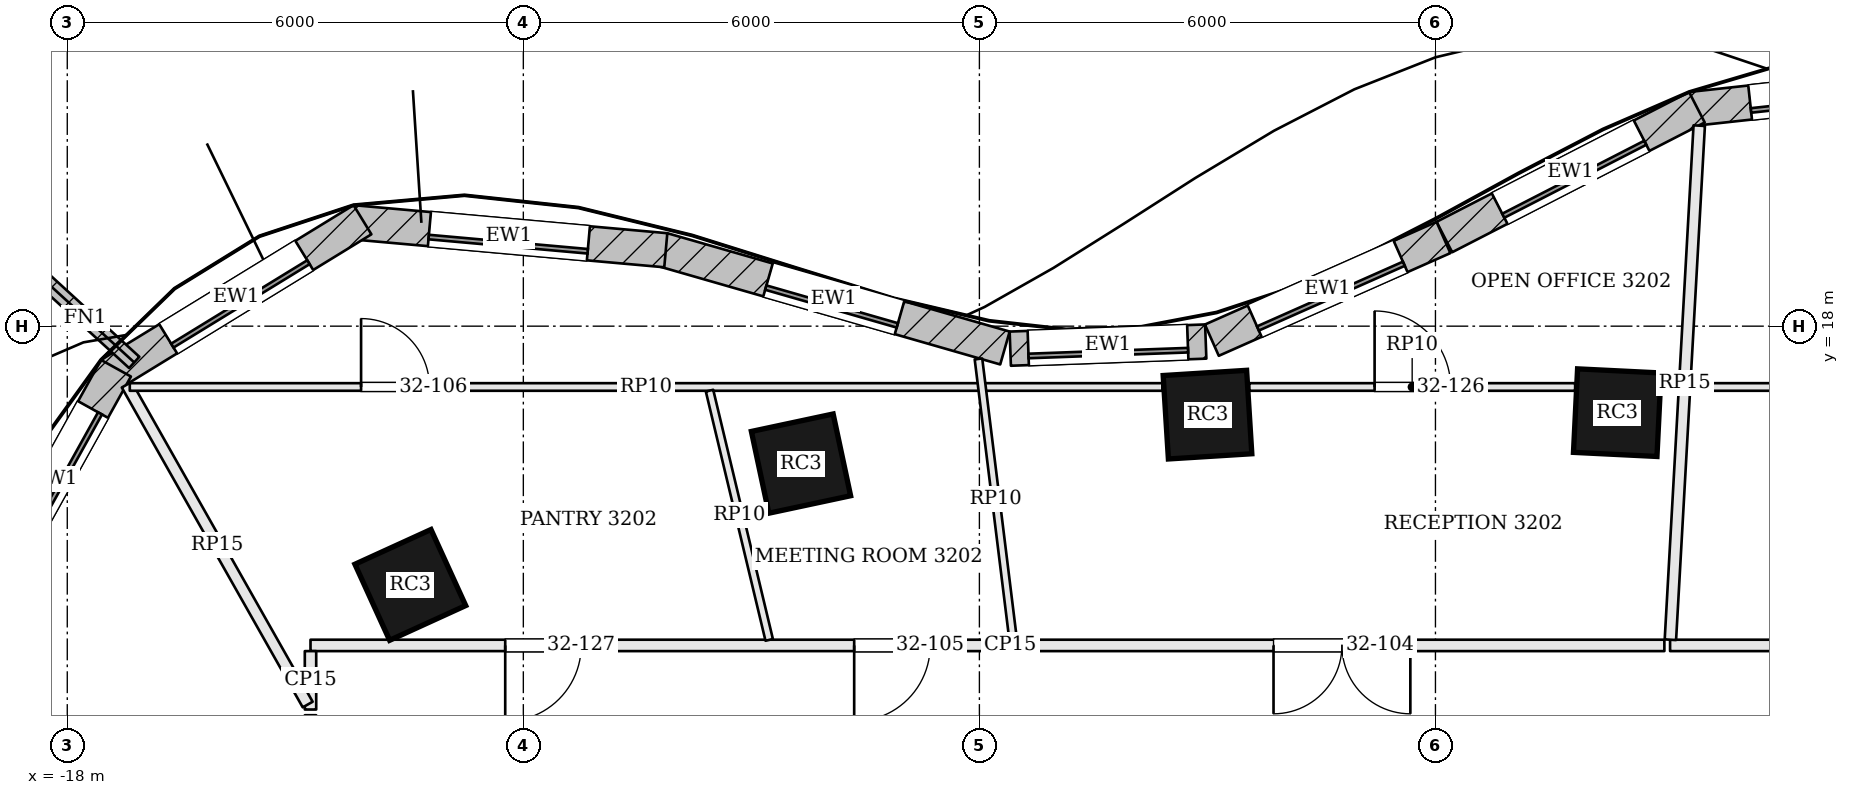
"""IFC4 building model, lengths in metres.
Left out: names, types, materials, properties, quantities, classifications, styles, units other than length and angle.
Written with IfcOpenShell. Run it as: python <this file> out.ifc"""

import sys

from ifc_helpers import new_model, si_unit, direction, frame, frame_2d, origin, origin_2d, place, context, subcontext, project, spatial, rectangle, extrude, element, fill, save


model = new_model("IFC4")
c1 = context("Model", 3, precision=1e-05, world=origin(), true_north=direction((0.0, 1.0)))
c2 = subcontext(c1, "Body", "Model", "MODEL_VIEW")
j1 = project(units=[si_unit("LENGTHUNIT", "METRE"), si_unit("PLANEANGLEUNIT", "RADIAN")], contexts=[c1])
p1 = place(None, origin())
s1 = spatial("IfcSite", under=j1, at=p1, CompositionType="ELEMENT")
p2 = place(p1, origin())
s2 = spatial("IfcBuilding", under=s1, at=p2, CompositionType="ELEMENT")
p3 = place(p2, frame((0.0, 0.0, 134.4)))
s3 = spatial("IfcBuildingStorey", under=s2, at=p3, CompositionType="ELEMENT", Elevation=134.4)
for number, where, z_axis, x_axis in (
    (1, (2.392, 16.862, 0.0), (0.0, 0.0, 1.0), (-0.999, 0.049, 0.0)),
    (2, (-2.999, 16.836, 0.0), (0.0, 0.0, 1.0), (-0.998, -0.062, 0.0)),
    (3, (-8.347, 16.192, 0.0), (0.0, 0.0, 1.0), (-0.978, -0.209, 0.0)),
    (4, (-13.487, 14.596, 0.0), (0.0, 0.0, 1.0), (-0.91, -0.415, 0.0)),
):
    element("IfcColumn", number, at=place(p3, frame(where, z_axis=z_axis, x_axis=x_axis)), inside=s3, PredefinedType="COLUMN", context=c2, shape_type="SweptSolid", body=[
        extrude(rectangle(XDim=1.1, YDim=1.1, at=origin_2d()), origin(), (0.0, 0.0, 1.0), 3.9),
    ])
p4 = place(p3, frame((7.003, 21.255, 0.0), z_axis=(0.0, 0.0, 1.0), x_axis=(-0.99407653264, -0.108682322638, 0.0)))
e5 = element("IfcWall", 5, at=p4, inside=s3, PredefinedType="SOLIDWALL", context=c2, shape_type="SweptSolid", body=[
    extrude(rectangle(XDim=3.662, YDim=0.45, at=frame_2d((1.831, 0.0))), origin(), (0.0, 0.0, 1.0), 3.7),
])
p5 = place(p4, frame((0.781, 0.0, 0.9)))
e6 = element("IfcOpeningElement", 6, at=p5, cuts=e5, PredefinedType="OPENING", context=c2, shape_type="SweptSolid", body=[
    extrude(rectangle(XDim=2.1, YDim=2.3, at=frame_2d((1.05, 1.15))), frame((0.0, 0.235, 0.0), z_axis=(0.0, -1.0, 0.0), x_axis=(1.0, 0.0, 0.0)), (0.0, 0.0, 1.0), 0.47),
])
p6 = place(p3, frame((3.44, 20.88, 0.0), z_axis=(0.0, 0.0, 1.0), x_axis=(-0.889471529144, -0.456990589446, 0.0)))
e7 = element("IfcWall", 7, at=p6, inside=s3, PredefinedType="SOLIDWALL", context=c2, shape_type="SweptSolid", body=[
    extrude(rectangle(XDim=3.735, YDim=0.45, at=frame_2d((1.868, 0.0))), origin(), (0.0, 0.0, 1.0), 3.7),
])
p7 = place(p6, frame((0.818, 0.0, 0.9)))
e8 = element("IfcOpeningElement", 8, at=p7, cuts=e7, PredefinedType="OPENING", context=c2, shape_type="SweptSolid", body=[
    extrude(rectangle(XDim=2.1, YDim=2.3, at=frame_2d((1.05, 1.15))), frame((0.0, 0.235, 0.0), z_axis=(0.0, -1.0, 0.0), x_axis=(1.0, 0.0, 0.0)), (0.0, 0.0, 1.0), 0.47),
])
p8 = place(p3, frame((0.105, 19.167, 0.0), z_axis=(0.0, 0.0, 1.0), x_axis=(-0.91414046241, -0.405397601109, 0.0)))
e9 = element("IfcWall", 9, at=p8, inside=s3, PredefinedType="SOLIDWALL", context=c2, shape_type="SweptSolid", body=[
    extrude(rectangle(XDim=3.333, YDim=0.45, at=frame_2d((1.667, 0.0))), origin(), (0.0, 0.0, 1.0), 3.7),
])
p9 = place(p8, frame((0.617, 0.0, 0.9)))
e10 = element("IfcOpeningElement", 10, at=p9, cuts=e9, PredefinedType="OPENING", context=c2, shape_type="SweptSolid", body=[
    extrude(rectangle(XDim=2.1, YDim=2.3, at=frame_2d((1.05, 1.15))), frame((0.0, 0.235, 0.0), z_axis=(0.0, -1.0, 0.0), x_axis=(1.0, 0.0, 0.0)), (0.0, 0.0, 1.0), 0.47),
])
p10 = place(p3, frame((-3.022, 17.798, 0.0), z_axis=(0.0, 0.0, 1.0), x_axis=(-0.999339560591, -0.036337895349, 0.0)))
e11 = element("IfcWall", 11, at=p10, inside=s3, PredefinedType="SOLIDWALL", context=c2, shape_type="SweptSolid", body=[
    extrude(rectangle(XDim=2.573, YDim=0.45, at=frame_2d((1.287, 0.0))), origin(), (0.0, 0.0, 1.0), 3.7),
])
p11 = place(p10, frame((0.237, 0.0, 0.9)))
e12 = element("IfcOpeningElement", 12, at=p11, cuts=e11, PredefinedType="OPENING", context=c2, shape_type="SweptSolid", body=[
    extrude(rectangle(XDim=2.1, YDim=2.3, at=frame_2d((1.05, 1.15))), frame((0.0, 0.235, 0.0), z_axis=(0.0, -1.0, 0.0), x_axis=(1.0, 0.0, 0.0)), (0.0, 0.0, 1.0), 0.47),
])
p12 = place(p3, frame((-5.664, 17.713, 0.0), z_axis=(0.0, 0.0, 1.0), x_axis=(-0.961108031684, 0.276172684083, 0.0)))
e13 = element("IfcWall", 13, at=p12, inside=s3, PredefinedType="SOLIDWALL", context=c2, shape_type="SweptSolid", body=[
    extrude(rectangle(XDim=4.686, YDim=0.45, at=frame_2d((2.343, 0.0))), origin(), (0.0, 0.0, 1.0), 3.7),
])
p13 = place(p12, frame((1.443, 0.0, 0.9)))
e14 = element("IfcOpeningElement", 14, at=p13, cuts=e13, PredefinedType="OPENING", context=c2, shape_type="SweptSolid", body=[
    extrude(rectangle(XDim=1.8, YDim=2.3, at=frame_2d((0.9, 1.15))), frame((0.0, 0.235, 0.0), z_axis=(0.0, -1.0, 0.0), x_axis=(1.0, 0.0, 0.0)), (0.0, 0.0, 1.0), 0.47),
])
p14 = place(p3, frame((-10.126, 18.999, 0.0), z_axis=(0.0, 0.0, 1.0), x_axis=(-0.996031087117, 0.089006030672, 0.0)))
e15 = element("IfcWall", 15, at=p14, inside=s3, PredefinedType="SOLIDWALL", context=c2, shape_type="SweptSolid", body=[
    extrude(rectangle(XDim=4.145, YDim=0.45, at=frame_2d((2.072, 0.0))), origin(), (0.0, 0.0, 1.0), 3.7),
])
p15 = place(p14, frame((1.022, 0.0, 0.9)))
e16 = element("IfcOpeningElement", 16, at=p15, cuts=e15, PredefinedType="OPENING", context=c2, shape_type="SweptSolid", body=[
    extrude(rectangle(XDim=2.1, YDim=2.3, at=frame_2d((1.05, 1.15))), frame((0.0, 0.235, 0.0), z_axis=(0.0, -1.0, 0.0), x_axis=(1.0, 0.0, 0.0)), (0.0, 0.0, 1.0), 0.47),
])
p16 = place(p3, frame((-14.116, 19.4, 0.0), z_axis=(0.0, 0.0, 1.0), x_axis=(-0.852622865325, -0.522526793117, 0.0)))
e17 = element("IfcWall", 17, at=p16, inside=s3, PredefinedType="SOLIDWALL", context=c2, shape_type="SweptSolid", body=[
    extrude(rectangle(XDim=3.896, YDim=0.45, at=frame_2d((1.948, 0.0))), origin(), (0.0, 0.0, 1.0), 3.7),
])
p17 = place(p16, frame((0.898, 0.0, 0.9)))
e18 = element("IfcOpeningElement", 18, at=p17, cuts=e17, PredefinedType="OPENING", context=c2, shape_type="SweptSolid", body=[
    extrude(rectangle(XDim=2.1, YDim=2.3, at=frame_2d((1.05, 1.15))), frame((0.0, 0.235, 0.0), z_axis=(0.0, -1.0, 0.0), x_axis=(1.0, 0.0, 0.0)), (0.0, 0.0, 1.0), 0.47),
])
p18 = place(p3, frame((-17.359, 17.447, 0.0), z_axis=(0.0, 0.0, 1.0), x_axis=(-0.485618126214, -0.874171056197, 0.0)))
e19 = element("IfcWall", 19, at=p18, inside=s3, PredefinedType="SOLIDWALL", context=c2, shape_type="SweptSolid", body=[
    extrude(rectangle(XDim=3.343, YDim=0.45, at=frame_2d((1.671, 0.0))), origin(), (0.0, 0.0, 1.0), 3.7),
])
p19 = place(p18, frame((0.621, 0.0, 0.9)))
e20 = element("IfcOpeningElement", 20, at=p19, cuts=e19, PredefinedType="OPENING", context=c2, shape_type="SweptSolid", body=[
    extrude(rectangle(XDim=2.1, YDim=2.3, at=frame_2d((1.05, 1.15))), frame((0.0, 0.235, 0.0), z_axis=(0.0, -1.0, 0.0), x_axis=(1.0, 0.0, 0.0)), (0.0, 0.0, 1.0), 0.47),
])
p20 = place(p3, frame((-17.119, 17.523, 0.0), z_axis=(0.0, 0.0, 1.0), x_axis=(-0.737866019047, 0.674947211221, 0.0)))
e21 = element("IfcWall", 21, at=p20, inside=s3, PredefinedType="SOLIDWALL", context=c2, shape_type="SweptSolid", body=[
    extrude(rectangle(XDim=1.75, YDim=0.2, at=frame_2d((0.875, 0.0))), origin(), (0.0, 0.0, 1.0), 3.7),
])
p21 = place(p3, frame((14.725, 13.8, 0.0), z_axis=(0.0, 0.0, 1.0), x_axis=(-1.0, 0.0, 0.0)))
e22 = element("IfcWall", 22, at=p21, inside=s3, PredefinedType="PARTITIONING", context=c2, shape_type="SweptSolid", body=[
    extrude(rectangle(XDim=11.638, YDim=0.15, at=frame_2d((5.819, 0.0))), origin(), (0.0, 0.0, 1.0), 3.198),
])
p22 = place(p21, frame((2.95, 0.0, 0.0)))
e23 = element("IfcOpeningElement", 23, at=p22, cuts=e22, PredefinedType="OPENING", context=c2, shape_type="SweptSolid", body=[
    extrude(rectangle(XDim=1.0, YDim=2.1, at=frame_2d((0.5, 1.05))), frame((0.0, 0.085, 0.0), z_axis=(0.0, -1.0, 0.0), x_axis=(1.0, 0.0, 0.0)), (0.0, 0.0, 1.0), 0.17),
])
p23 = place(p21, frame((8.35, 0.0, 0.0)))
e24 = element("IfcOpeningElement", 24, at=p23, cuts=e22, PredefinedType="OPENING", context=c2, shape_type="SweptSolid", body=[
    extrude(rectangle(XDim=1.0, YDim=2.1, at=frame_2d((0.5, 1.05))), frame((0.0, 0.085, 0.0), z_axis=(0.0, -1.0, 0.0), x_axis=(1.0, 0.0, 0.0)), (0.0, 0.0, 1.0), 0.17),
])
p24 = place(p3, frame((3.47, 20.638, 0.0), z_axis=(0.0, 0.0, 1.0), x_axis=(-0.056008975247, -0.998430265312, 0.0)))
e25 = element("IfcWall", 25, at=p24, inside=s3, PredefinedType="PARTITIONING", context=c2, shape_type="SweptSolid", body=[
    extrude(rectangle(XDim=6.774, YDim=0.15, at=frame_2d((3.387, 0.0))), origin(), (0.0, 0.0, 1.0), 3.198),
])
p25 = place(p3, frame((3.012, 13.8, 0.0), z_axis=(0.0, 0.0, 1.0), x_axis=(-1.0, 0.0, 0.0)))
e26 = element("IfcWall", 26, at=p25, inside=s3, PredefinedType="PARTITIONING", context=c2, shape_type="SweptSolid", body=[
    extrude(rectangle(XDim=17.812, YDim=0.15, at=frame_2d((8.906, 0.0))), origin(), (0.0, 0.0, 1.0), 3.198),
])
p26 = place(p25, frame((3.342, 0.0, 0.0)))
e27 = element("IfcOpeningElement", 27, at=p26, cuts=e26, PredefinedType="OPENING", context=c2, shape_type="SweptSolid", body=[
    extrude(rectangle(XDim=1.8, YDim=2.1, at=frame_2d((0.9, 1.05))), frame((0.0, 0.085, 0.0), z_axis=(0.0, -1.0, 0.0), x_axis=(1.0, 0.0, 0.0)), (0.0, 0.0, 1.0), 0.17),
])
p27 = place(p25, frame((9.659, 0.0, 0.0)))
e28 = element("IfcOpeningElement", 28, at=p27, cuts=e26, PredefinedType="OPENING", context=c2, shape_type="SweptSolid", body=[
    extrude(rectangle(XDim=1.0, YDim=2.4, at=frame_2d((0.5, 1.2))), frame((0.0, 0.085, 0.0), z_axis=(0.0, -1.0, 0.0), x_axis=(1.0, 0.0, 0.0)), (0.0, 0.0, 1.0), 0.17),
])
p28 = place(p25, frame((14.25, 0.0, 0.0)))
e29 = element("IfcOpeningElement", 29, at=p28, cuts=e26, PredefinedType="OPENING", context=c2, shape_type="SweptSolid", body=[
    extrude(rectangle(XDim=1.0, YDim=2.1, at=frame_2d((0.5, 1.05))), frame((0.0, 0.085, 0.0), z_axis=(0.0, -1.0, 0.0), x_axis=(1.0, 0.0, 0.0)), (0.0, 0.0, 1.0), 0.17),
])
p29 = place(p3, frame((-14.8, 13.725, 0.0), z_axis=(0.0, 0.0, 1.0), x_axis=(0.0, -1.0, 0.0)))
e30 = element("IfcWall", 30, at=p29, inside=s3, PredefinedType="PARTITIONING", context=c2, shape_type="SweptSolid", body=[
    extrude(rectangle(XDim=0.769, YDim=0.15, at=frame_2d((0.384, 0.0))), origin(), (0.0, 0.0, 1.0), 3.198),
])
p30 = place(p3, frame((-17.218, 17.23, 0.0), z_axis=(0.0, 0.0, 1.0), x_axis=(0.492436580725, -0.870348329098, 0.0)))
e31 = element("IfcWall", 31, at=p30, inside=s3, PredefinedType="PARTITIONING", context=c2, shape_type="SweptSolid", body=[
    extrude(rectangle(XDim=4.835, YDim=0.15, at=frame_2d((2.417, 0.0))), origin(), (0.0, 0.0, 1.0), 3.198),
])
p31 = place(p3, frame((-14.8, 12.882, 0.0), z_axis=(0.0, 0.0, 1.0), x_axis=(0.0, -1.0, 0.0)))
e32 = element("IfcWall", 32, at=p31, inside=s3, PredefinedType="PARTITIONING", context=c2, shape_type="SweptSolid", body=[
    extrude(rectangle(XDim=16.652, YDim=0.15, at=frame_2d((8.326, 0.0))), origin(), (0.0, 0.0, 1.0), 3.198),
])
p32 = place(p31, frame((2.599, 0.0, 0.0)))
e33 = element("IfcOpeningElement", 33, at=p32, cuts=e32, PredefinedType="OPENING", context=c2, shape_type="SweptSolid", body=[
    extrude(rectangle(XDim=1.8, YDim=2.1, at=frame_2d((0.9, 1.05))), frame((0.0, 0.085, 0.0), z_axis=(0.0, -1.0, 0.0), x_axis=(1.0, 0.0, 0.0)), (0.0, 0.0, 1.0), 0.17),
])
p33 = place(p31, frame((9.456, 0.0, 0.0)))
e34 = element("IfcOpeningElement", 34, at=p33, cuts=e32, PredefinedType="OPENING", context=c2, shape_type="SweptSolid", body=[
    extrude(rectangle(XDim=1.0, YDim=2.4, at=frame_2d((0.5, 1.2))), frame((0.0, 0.085, 0.0), z_axis=(0.0, -1.0, 0.0), x_axis=(1.0, 0.0, 0.0)), (0.0, 0.0, 1.0), 0.17),
])
p34 = place(p31, frame((14.15, 0.0, 0.0)))
e35 = element("IfcOpeningElement", 35, at=p34, cuts=e32, PredefinedType="OPENING", context=c2, shape_type="SweptSolid", body=[
    extrude(rectangle(XDim=1.0, YDim=2.1, at=frame_2d((0.5, 1.05))), frame((0.0, 0.085, 0.0), z_axis=(0.0, -1.0, 0.0), x_axis=(1.0, 0.0, 0.0)), (0.0, 0.0, 1.0), 0.17),
])
p35 = place(p3, frame((3.298, 17.2, 0.0), z_axis=(0.0, 0.0, 1.0), x_axis=(1.0, 0.0, 0.0)))
e36 = element("IfcWall", 36, at=p35, inside=s3, PredefinedType="PARTITIONING", context=c2, shape_type="SweptSolid", body=[
    extrude(rectangle(XDim=8.85, YDim=0.1, at=frame_2d((4.425, 0.0))), origin(), (0.0, 0.0, 1.0), 3.184),
])
p36 = place(p3, frame((-17.178, 17.2, 0.0), z_axis=(0.0, 0.0, 1.0), x_axis=(1.0, 0.0, 0.0)))
e37 = element("IfcWall", 37, at=p36, inside=s3, PredefinedType="PARTITIONING", context=c2, shape_type="SweptSolid", body=[
    extrude(rectangle(XDim=13.585, YDim=0.1, at=frame_2d((6.792, 0.0))), origin(), (0.0, 0.0, 1.0), 3.184),
])
p37 = place(p36, frame((3.043, 0.0, 0.0)))
e38 = element("IfcOpeningElement", 38, at=p37, cuts=e37, PredefinedType="OPENING", context=c2, shape_type="SweptSolid", body=[
    extrude(rectangle(XDim=0.9, YDim=2.1, at=frame_2d((0.45, 1.05))), frame((0.0, 0.06, 0.0), z_axis=(0.0, -1.0, 0.0), x_axis=(1.0, 0.0, 0.0)), (0.0, 0.0, 1.0), 0.12),
])
p38 = place(p3, frame((-2.451, 17.2, 0.0), z_axis=(0.0, 0.0, 1.0), x_axis=(1.0, 0.0, 0.0)))
e39 = element("IfcWall", 39, at=p38, inside=s3, PredefinedType="PARTITIONING", context=c2, shape_type="SweptSolid", body=[
    extrude(rectangle(XDim=4.289, YDim=0.1, at=frame_2d((2.144, 0.0))), origin(), (0.0, 0.0, 1.0), 3.184),
])
p39 = place(p38, frame((1.65, 0.0, 0.0)))
e40 = element("IfcOpeningElement", 40, at=p39, cuts=e39, PredefinedType="OPENING", context=c2, shape_type="SweptSolid", body=[
    extrude(rectangle(XDim=1.0, YDim=2.1, at=frame_2d((0.5, 1.05))), frame((0.0, 0.06, 0.0), z_axis=(0.0, -1.0, 0.0), x_axis=(1.0, 0.0, 0.0)), (0.0, 0.0, 1.0), 0.12),
])
p40 = place(p3, frame((-5.556, 13.875, 0.0), z_axis=(0.0, 0.0, 1.0), x_axis=(-0.122573624649, 0.99245942312, 0.0)))
e41 = element("IfcWall", 41, at=p40, inside=s3, PredefinedType="PARTITIONING", context=c2, shape_type="SweptSolid", body=[
    extrude(rectangle(XDim=3.723, YDim=0.1, at=frame_2d((1.861, 0.0))), origin(), (0.0, 0.0, 1.0), 3.184),
])
p41 = place(p3, frame((-8.765, 13.873, 0.0), z_axis=(0.0, 0.0, 1.0), x_axis=(-0.232827854215, 0.972517963999, 0.0)))
e42 = element("IfcWall", 42, at=p41, inside=s3, PredefinedType="PARTITIONING", context=c2, shape_type="SweptSolid", body=[
    extrude(rectangle(XDim=3.371, YDim=0.1, at=frame_2d((1.686, 0.0))), origin(), (0.0, 0.0, 1.0), 3.184),
])
p42 = place(p5, origin())
e43 = element("IfcWindow", 43, at=p42, inside=s3, PartitioningType="SINGLE_PANEL", PredefinedType="WINDOW", context=c2, shape_type="SweptSolid", body=[
    extrude(rectangle(XDim=2.1, YDim=2.3, at=frame_2d((1.05, 1.15))), frame((0.0, 0.135, 0.0), z_axis=(0.0, -1.0, 0.0), x_axis=(1.0, 0.0, 0.0)), (0.0, 0.0, 1.0), 0.06),
])
fill(e6, e43)
p43 = place(p7, origin())
e44 = element("IfcWindow", 44, at=p43, inside=s3, PartitioningType="SINGLE_PANEL", PredefinedType="WINDOW", context=c2, shape_type="SweptSolid", body=[
    extrude(rectangle(XDim=2.1, YDim=2.3, at=frame_2d((1.05, 1.15))), frame((0.0, 0.135, 0.0), z_axis=(0.0, -1.0, 0.0), x_axis=(1.0, 0.0, 0.0)), (0.0, 0.0, 1.0), 0.06),
])
fill(e8, e44)
p44 = place(p9, origin())
e45 = element("IfcWindow", 45, at=p44, inside=s3, PartitioningType="SINGLE_PANEL", PredefinedType="WINDOW", context=c2, shape_type="SweptSolid", body=[
    extrude(rectangle(XDim=2.1, YDim=2.3, at=frame_2d((1.05, 1.15))), frame((0.0, 0.135, 0.0), z_axis=(0.0, -1.0, 0.0), x_axis=(1.0, 0.0, 0.0)), (0.0, 0.0, 1.0), 0.06),
])
fill(e10, e45)
p45 = place(p11, origin())
e46 = element("IfcWindow", 46, at=p45, inside=s3, PartitioningType="SINGLE_PANEL", PredefinedType="WINDOW", context=c2, shape_type="SweptSolid", body=[
    extrude(rectangle(XDim=2.1, YDim=2.3, at=frame_2d((1.05, 1.15))), frame((0.0, 0.135, 0.0), z_axis=(0.0, -1.0, 0.0), x_axis=(1.0, 0.0, 0.0)), (0.0, 0.0, 1.0), 0.06),
])
fill(e12, e46)
p46 = place(p13, origin())
e47 = element("IfcWindow", 47, at=p46, inside=s3, PartitioningType="SINGLE_PANEL", PredefinedType="WINDOW", context=c2, shape_type="SweptSolid", body=[
    extrude(rectangle(XDim=1.8, YDim=2.3, at=frame_2d((0.9, 1.15))), frame((0.0, 0.135, 0.0), z_axis=(0.0, -1.0, 0.0), x_axis=(1.0, 0.0, 0.0)), (0.0, 0.0, 1.0), 0.06),
])
fill(e14, e47)
p47 = place(p15, origin())
e48 = element("IfcWindow", 48, at=p47, inside=s3, PartitioningType="SINGLE_PANEL", PredefinedType="WINDOW", context=c2, shape_type="SweptSolid", body=[
    extrude(rectangle(XDim=2.1, YDim=2.3, at=frame_2d((1.05, 1.15))), frame((0.0, 0.135, 0.0), z_axis=(0.0, -1.0, 0.0), x_axis=(1.0, 0.0, 0.0)), (0.0, 0.0, 1.0), 0.06),
])
fill(e16, e48)
p48 = place(p17, origin())
e49 = element("IfcWindow", 49, at=p48, inside=s3, PartitioningType="SINGLE_PANEL", PredefinedType="WINDOW", context=c2, shape_type="SweptSolid", body=[
    extrude(rectangle(XDim=2.1, YDim=2.3, at=frame_2d((1.05, 1.15))), frame((0.0, 0.135, 0.0), z_axis=(0.0, -1.0, 0.0), x_axis=(1.0, 0.0, 0.0)), (0.0, 0.0, 1.0), 0.06),
])
fill(e18, e49)
p49 = place(p19, origin())
e50 = element("IfcWindow", 50, at=p49, inside=s3, PartitioningType="SINGLE_PANEL", PredefinedType="WINDOW", context=c2, shape_type="SweptSolid", body=[
    extrude(rectangle(XDim=2.1, YDim=2.3, at=frame_2d((1.05, 1.15))), frame((0.0, 0.135, 0.0), z_axis=(0.0, -1.0, 0.0), x_axis=(1.0, 0.0, 0.0)), (0.0, 0.0, 1.0), 0.06),
])
fill(e20, e50)
p50 = place(p26, origin())
e51 = element("IfcDoor", 51, at=p50, inside=s3, OperationType="DOUBLE_DOOR_SINGLE_SWING", PredefinedType="DOOR", context=c2, shape_type="SweptSolid", body=[
    extrude(rectangle(XDim=1.8, YDim=2.1, at=frame_2d((0.9, 1.05))), frame((0.0, 0.025, 0.0), z_axis=(0.0, -1.0, 0.0), x_axis=(1.0, 0.0, 0.0)), (0.0, 0.0, 1.0), 0.05),
])
fill(e27, e51)
p51 = place(p27, origin())
e52 = element("IfcDoor", 52, at=p51, inside=s3, OperationType="SINGLE_SWING_RIGHT", PredefinedType="DOOR", context=c2, shape_type="SweptSolid", body=[
    extrude(rectangle(XDim=1.0, YDim=2.4, at=frame_2d((0.5, 1.2))), frame((0.0, 0.025, 0.0), z_axis=(0.0, -1.0, 0.0), x_axis=(1.0, 0.0, 0.0)), (0.0, 0.0, 1.0), 0.05),
])
fill(e28, e52)
p52 = place(p37, origin())
e53 = element("IfcDoor", 53, at=p52, inside=s3, OperationType="SINGLE_SWING_LEFT", PredefinedType="DOOR", context=c2, shape_type="SweptSolid", body=[
    extrude(rectangle(XDim=0.9, YDim=2.1, at=frame_2d((0.45, 1.05))), frame((0.0, 0.025, 0.0), z_axis=(0.0, -1.0, 0.0), x_axis=(1.0, 0.0, 0.0)), (0.0, 0.0, 1.0), 0.05),
])
fill(e38, e53)
p53 = place(p39, origin())
e54 = element("IfcDoor", 54, at=p53, inside=s3, OperationType="SINGLE_SWING_LEFT", PredefinedType="DOOR", context=c2, shape_type="SweptSolid", body=[
    extrude(rectangle(XDim=1.0, YDim=2.1, at=frame_2d((0.5, 1.05))), frame((0.0, 0.025, 0.0), z_axis=(0.0, -1.0, 0.0), x_axis=(1.0, 0.0, 0.0)), (0.0, 0.0, 1.0), 0.05),
])
fill(e40, e54)
p54 = place(p28, origin())
e55 = element("IfcDoor", 55, at=p54, inside=s3, OperationType="SINGLE_SWING_RIGHT", PredefinedType="DOOR", context=c2, shape_type="SweptSolid", body=[
    extrude(rectangle(XDim=1.0, YDim=2.1, at=frame_2d((0.5, 1.05))), frame((0.0, 0.025, 0.0), z_axis=(0.0, -1.0, 0.0), x_axis=(1.0, 0.0, 0.0)), (0.0, 0.0, 1.0), 0.05),
])
fill(e29, e55)
save(model, sys.argv[1])
